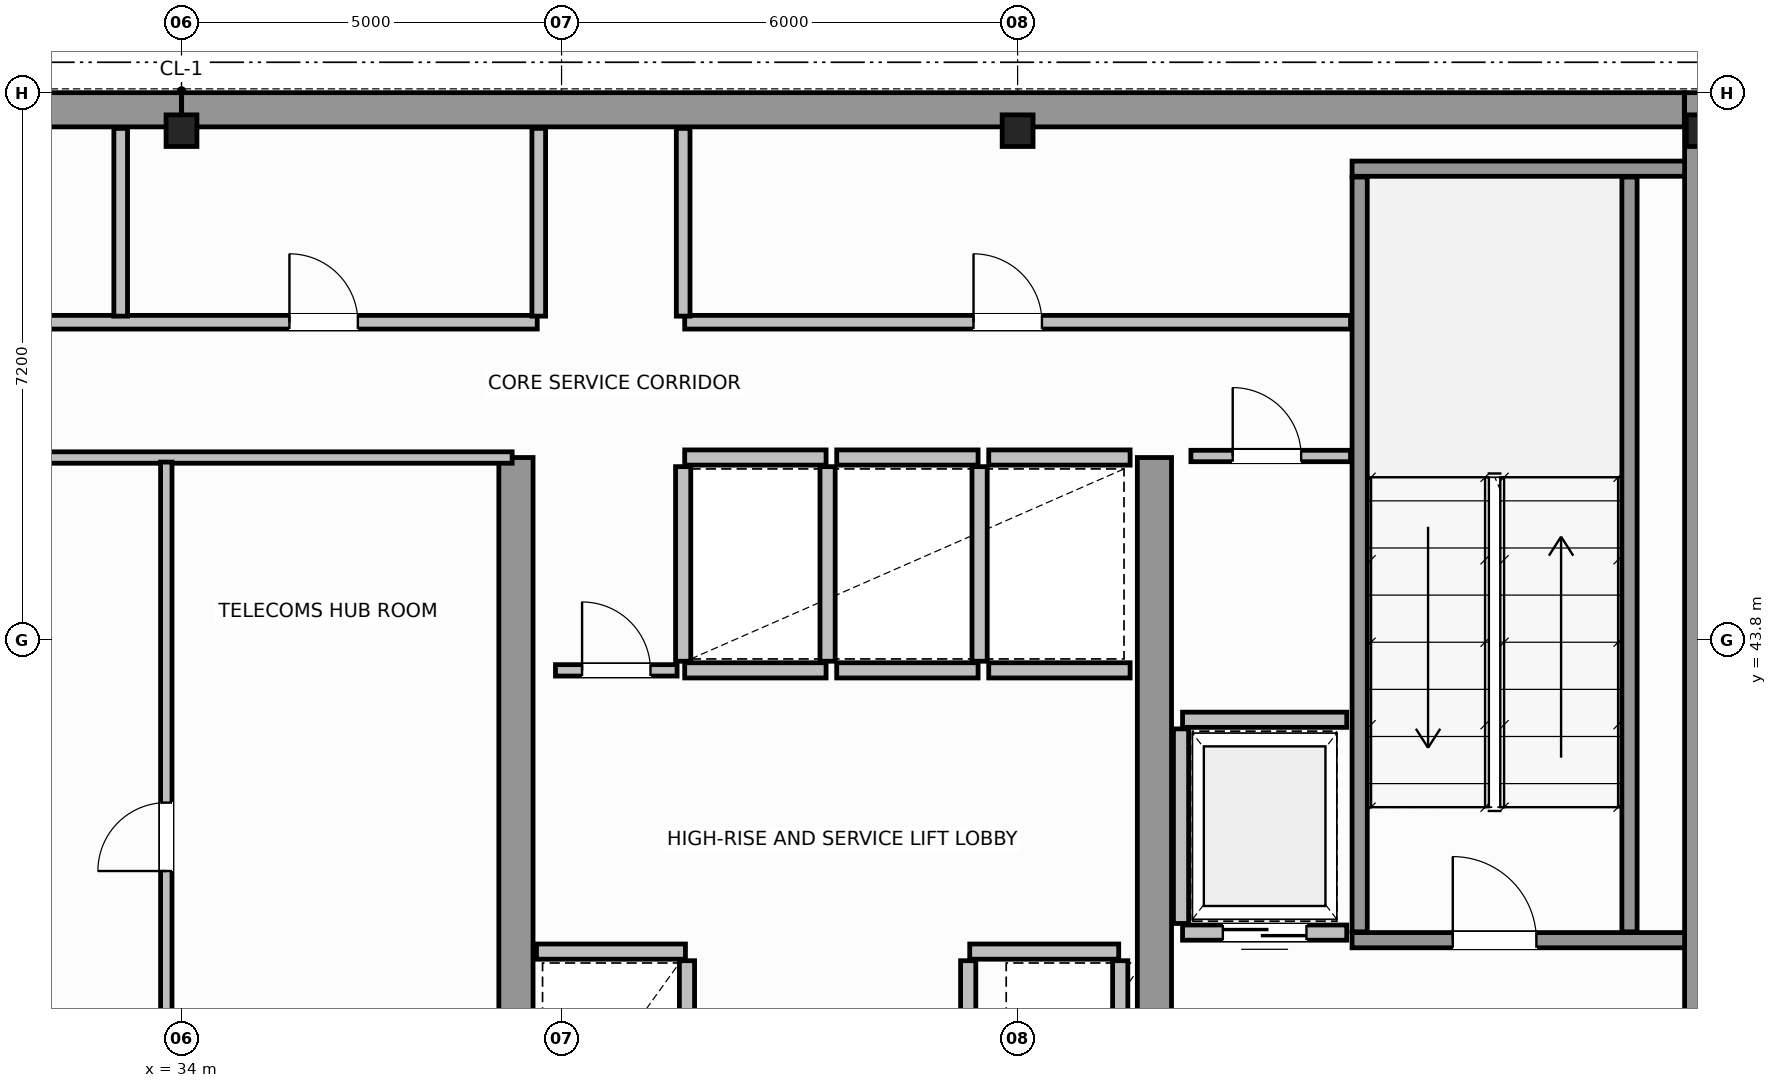
"""IFC4 building model, lengths in metres.
Left out: names, types, materials, properties, quantities, classifications, styles, units other than length and angle.
Written with IfcOpenShell. Run it as: python <this file> out.ifc"""

import sys

from ifc_helpers import new_model, si_unit, direction, frame, frame_2d, origin, origin_2d, place, context, subcontext, project, spatial, rectangle, i_section, extrude, source, transform, mapped, element, fill, save


model = new_model("IFC4")
c1 = context("Model", 3, precision=1e-05, world=origin(), true_north=direction((0.0, 1.0)))
c2 = subcontext(c1, "Body", "Model", "MODEL_VIEW")
j1 = project(units=[si_unit("LENGTHUNIT", "METRE"), si_unit("PLANEANGLEUNIT", "RADIAN")], contexts=[c1])
p1 = place(None, origin())
s1 = spatial("IfcSite", under=j1, at=p1, CompositionType="ELEMENT")
p2 = place(p1, origin())
s2 = spatial("IfcBuilding", under=s1, at=p2, CompositionType="ELEMENT")
p3 = place(p2, frame((0.0, 0.0, 303.8)))
s3 = spatial("IfcBuildingStorey", under=s2, at=p3, CompositionType="ELEMENT", Elevation=303.8)
m1 = source(origin(), c2, "Body", "SweptSolid", [
    extrude(i_section(OverallWidth=0.406, OverallDepth=0.416, WebThickness=0.03, FlangeThickness=0.042, FilletRadius=0.015, at=origin_2d()), origin(), (0.0, 0.0, 1.0), 4.6),
])
for number, where, z_axis, x_axis in (
    (1, (34.0, 50.5, 0.0), (0.0, 0.0, 1.0), (1.0, 0.0, 0.0)),
    (2, (45.0, 50.5, 0.0), (0.0, 0.0, 1.0), (1.0, 0.0, 0.0)),
    (3, (54.0, 50.5, 0.0), (0.0, 0.0, 1.0), (1.0, 0.0, 0.0)),
):
    element("IfcColumn", number, at=place(p3, frame(where, z_axis=z_axis, x_axis=x_axis)), inside=s3, PredefinedType="COLUMN", context=c2, shape_type="MappedRepresentation", body=[
        mapped(m1, transform((0.0, 0.0, 0.0), scale=1.0)),
    ])
for number, where, z_axis, x_axis in (
    (4, (14.229, 50.775, 0.0), (0.0, 0.0, 1.0), (1.0, 0.0, 0.0)),
    (5, (34.002, 50.775, 0.0), (0.0, 0.0, 1.0), (1.0, 0.0, 0.0)),
):
    element("IfcWall", number, at=place(p3, frame(where, z_axis=z_axis, x_axis=x_axis)), inside=s3, PredefinedType="SHEAR", context=c2, shape_type="SweptSolid", body=[
        extrude(rectangle(XDim=19.769, YDim=0.45, at=frame_2d((9.885, 0.0))), origin(), (0.0, 0.0, 1.0), 4.6),
    ])
p4 = place(p3, frame((54.0, 36.5, 0.0), z_axis=(0.0, 0.0, 1.0), x_axis=(0.0, 1.0, 0.0)))
e6 = element("IfcWall", 6, at=p4, inside=s3, PredefinedType="SHEAR", context=c2, shape_type="SweptSolid", body=[
    extrude(rectangle(XDim=14.5, YDim=0.45, at=frame_2d((7.25, 0.0))), origin(), (0.0, 0.0, 1.0), 4.6),
])
for number, where, z_axis, x_axis in (
    (7, (38.4, 36.745, 0.0), (0.0, 0.0, 1.0), (0.0, 1.0, 0.0)),
    (8, (46.8, 36.745, 0.0), (0.0, 0.0, 1.0), (0.0, 1.0, 0.0)),
):
    element("IfcWall", number, at=place(p3, frame(where, z_axis=z_axis, x_axis=x_axis)), inside=s3, PredefinedType="SHEAR", context=c2, shape_type="SweptSolid", body=[
        extrude(rectangle(XDim=9.455, YDim=0.45, at=frame_2d((4.728, 0.0))), origin(), (0.0, 0.0, 1.0), 4.6),
    ])
p5 = place(p3, frame((49.4, 39.85, 0.0), z_axis=(0.0, 0.0, 1.0), x_axis=(1.0, 0.0, 0.0)))
e9 = element("IfcWall", 9, at=p5, inside=s3, PredefinedType="SOLIDWALL", context=c2, shape_type="SweptSolid", body=[
    extrude(rectangle(XDim=4.375, YDim=0.2, at=frame_2d((2.188, 0.0))), origin(), (0.0, 0.0, 1.0), 4.6),
])
p6 = place(p5, frame((1.325, 0.0, 0.0)))
e10 = element("IfcOpeningElement", 10, at=p6, cuts=e9, PredefinedType="OPENING", context=c2, shape_type="SweptSolid", body=[
    extrude(rectangle(XDim=1.1, YDim=2.15, at=frame_2d((0.55, 1.075))), frame((0.0, 0.11, 0.0), z_axis=(0.0, -1.0, 0.0), x_axis=(1.0, 0.0, 0.0)), (0.0, 0.0, 1.0), 0.22),
])
p7 = place(p3, frame((49.4, 50.0, 0.0), z_axis=(0.0, 0.0, 1.0), x_axis=(1.0, 0.0, 0.0)))
e11 = element("IfcWall", 11, at=p7, inside=s3, PredefinedType="SOLIDWALL", context=c2, shape_type="SweptSolid", body=[
    extrude(rectangle(XDim=4.375, YDim=0.2, at=frame_2d((2.188, 0.0))), origin(), (0.0, 0.0, 1.0), 4.6),
])
for number, where, z_axis, x_axis in (
    (12, (49.5, 39.96, 0.0), (0.0, 0.0, 1.0), (0.0, 1.0, 0.0)),
    (13, (53.05, 39.96, 0.0), (0.0, 0.0, 1.0), (0.0, 1.0, 0.0)),
):
    element("IfcWall", number, at=place(p3, frame(where, z_axis=z_axis, x_axis=x_axis)), inside=s3, PredefinedType="SOLIDWALL", context=c2, shape_type="SweptSolid", body=[
        extrude(rectangle(XDim=9.93, YDim=0.2, at=frame_2d((4.965, 0.0))), origin(), (0.0, 0.0, 1.0), 4.6),
    ])
p8 = place(p3, frame((38.67, 39.7, 0.0), z_axis=(0.0, 0.0, 1.0), x_axis=(1.0, 0.0, 0.0)))
e14 = element("IfcWall", 14, at=p8, inside=s3, PredefinedType="SOLIDWALL", context=c2, shape_type="SweptSolid", body=[
    extrude(rectangle(XDim=1.96, YDim=0.2, at=frame_2d((0.98, 0.0))), origin(), (0.0, 0.0, 1.0), 4.3),
])
p9 = place(p3, frame((40.65, 37.02, 0.0), z_axis=(0.0, 0.0, 1.0), x_axis=(0.0, 1.0, 0.0)))
e15 = element("IfcWall", 15, at=p9, inside=s3, PredefinedType="SOLIDWALL", context=c2, shape_type="SweptSolid", body=[
    extrude(rectangle(XDim=2.56, YDim=0.2, at=frame_2d((1.28, 0.0))), origin(), (0.0, 0.0, 1.0), 4.3),
])
p10 = place(p3, frame((44.37, 39.7, 0.0), z_axis=(0.0, 0.0, 1.0), x_axis=(1.0, 0.0, 0.0)))
e16 = element("IfcWall", 16, at=p10, inside=s3, PredefinedType="SOLIDWALL", context=c2, shape_type="SweptSolid", body=[
    extrude(rectangle(XDim=1.96, YDim=0.2, at=frame_2d((0.98, 0.0))), origin(), (0.0, 0.0, 1.0), 4.3),
])
for number, where, z_axis, x_axis in (
    (17, (44.35, 37.02, 0.0), (0.0, 0.0, 1.0), (0.0, 1.0, 0.0)),
    (18, (46.35, 37.02, 0.0), (0.0, 0.0, 1.0), (0.0, 1.0, 0.0)),
):
    element("IfcWall", number, at=place(p3, frame(where, z_axis=z_axis, x_axis=x_axis)), inside=s3, PredefinedType="SOLIDWALL", context=c2, shape_type="SweptSolid", body=[
        extrude(rectangle(XDim=2.56, YDim=0.2, at=frame_2d((1.28, 0.0))), origin(), (0.0, 0.0, 1.0), 4.3),
    ])
for number, where, z_axis, x_axis in (
    (19, (40.62, 43.4, 0.0), (0.0, 0.0, 1.0), (1.0, 0.0, 0.0)),
    (20, (40.62, 46.2, 0.0), (0.0, 0.0, 1.0), (1.0, 0.0, 0.0)),
):
    element("IfcWall", number, at=place(p3, frame(where, z_axis=z_axis, x_axis=x_axis)), inside=s3, PredefinedType="SOLIDWALL", context=c2, shape_type="SweptSolid", body=[
        extrude(rectangle(XDim=1.86, YDim=0.2, at=frame_2d((0.93, 0.0))), origin(), (0.0, 0.0, 1.0), 4.3),
    ])
for number, where, z_axis, x_axis in (
    (21, (40.6, 43.52, 0.0), (0.0, 0.0, 1.0), (0.0, 1.0, 0.0)),
    (22, (42.5, 43.52, 0.0), (0.0, 0.0, 1.0), (0.0, 1.0, 0.0)),
):
    element("IfcWall", number, at=place(p3, frame(where, z_axis=z_axis, x_axis=x_axis)), inside=s3, PredefinedType="SOLIDWALL", context=c2, shape_type="SweptSolid", body=[
        extrude(rectangle(XDim=2.56, YDim=0.2, at=frame_2d((1.28, 0.0))), origin(), (0.0, 0.0, 1.0), 4.3),
    ])
for number, where, z_axis, x_axis in (
    (23, (42.62, 43.4, 0.0), (0.0, 0.0, 1.0), (1.0, 0.0, 0.0)),
    (24, (42.62, 46.2, 0.0), (0.0, 0.0, 1.0), (1.0, 0.0, 0.0)),
):
    element("IfcWall", number, at=place(p3, frame(where, z_axis=z_axis, x_axis=x_axis)), inside=s3, PredefinedType="SOLIDWALL", context=c2, shape_type="SweptSolid", body=[
        extrude(rectangle(XDim=1.86, YDim=0.2, at=frame_2d((0.93, 0.0))), origin(), (0.0, 0.0, 1.0), 4.3),
    ])
p11 = place(p3, frame((44.5, 43.52, 0.0), z_axis=(0.0, 0.0, 1.0), x_axis=(0.0, 1.0, 0.0)))
e25 = element("IfcWall", 25, at=p11, inside=s3, PredefinedType="SOLIDWALL", context=c2, shape_type="SweptSolid", body=[
    extrude(rectangle(XDim=2.56, YDim=0.2, at=frame_2d((1.28, 0.0))), origin(), (0.0, 0.0, 1.0), 3.09),
])
for number, where, z_axis, x_axis in (
    (26, (44.62, 43.4, 0.0), (0.0, 0.0, 1.0), (1.0, 0.0, 0.0)),
    (27, (44.62, 46.2, 0.0), (0.0, 0.0, 1.0), (1.0, 0.0, 0.0)),
):
    element("IfcWall", number, at=place(p3, frame(where, z_axis=z_axis, x_axis=x_axis)), inside=s3, PredefinedType="SOLIDWALL", context=c2, shape_type="SweptSolid", body=[
        extrude(rectangle(XDim=1.86, YDim=0.2, at=frame_2d((0.93, 0.0))), origin(), (0.0, 0.0, 1.0), 4.3),
    ])
p12 = place(p3, frame((47.17, 39.95, 0.0), z_axis=(0.0, 0.0, 1.0), x_axis=(1.0, 0.0, 0.0)))
e28 = element("IfcWall", 28, at=p12, inside=s3, PredefinedType="SOLIDWALL", context=c2, shape_type="SweptSolid", body=[
    extrude(rectangle(XDim=2.16, YDim=0.2, at=frame_2d((1.08, 0.0))), origin(), (0.0, 0.0, 1.0), 4.3),
])
p13 = place(p12, frame((0.53, 0.0, 0.0)))
e29 = element("IfcOpeningElement", 29, at=p13, cuts=e28, PredefinedType="OPENING", context=c2, shape_type="SweptSolid", body=[
    extrude(rectangle(XDim=1.1, YDim=2.15, at=frame_2d((0.55, 1.075))), frame((0.0, 0.11, 0.0), z_axis=(0.0, -1.0, 0.0), x_axis=(1.0, 0.0, 0.0)), (0.0, 0.0, 1.0), 0.22),
])
p14 = place(p3, frame((47.17, 42.75, 0.0), z_axis=(0.0, 0.0, 1.0), x_axis=(1.0, 0.0, 0.0)))
e30 = element("IfcWall", 30, at=p14, inside=s3, PredefinedType="SOLIDWALL", context=c2, shape_type="SweptSolid", body=[
    extrude(rectangle(XDim=2.16, YDim=0.2, at=frame_2d((1.08, 0.0))), origin(), (0.0, 0.0, 1.0), 4.3),
])
p15 = place(p3, frame((47.15, 40.07, 0.0), z_axis=(0.0, 0.0, 1.0), x_axis=(0.0, 1.0, 0.0)))
e31 = element("IfcWall", 31, at=p15, inside=s3, PredefinedType="SOLIDWALL", context=c2, shape_type="SweptSolid", body=[
    extrude(rectangle(XDim=2.56, YDim=0.2, at=frame_2d((1.28, 0.0))), origin(), (0.0, 0.0, 1.0), 4.3),
])
p16 = place(p3, frame((29.85, 46.2, 0.0), z_axis=(0.0, 0.0, 1.0), x_axis=(1.0, 0.0, 0.0)))
e32 = element("IfcWall", 32, at=p16, inside=s3, PredefinedType="PARTITIONING", context=c2, shape_type="SweptSolid", body=[
    extrude(rectangle(XDim=8.5, YDim=0.15, at=frame_2d((4.25, 0.0))), origin(), (0.0, 0.0, 1.0), 4.3),
])
p17 = place(p3, frame((33.8, 36.56, 0.0), z_axis=(0.0, 0.0, 1.0), x_axis=(0.0, 1.0, 0.0)))
e33 = element("IfcWall", 33, at=p17, inside=s3, PredefinedType="PARTITIONING", context=c2, shape_type="SweptSolid", body=[
    extrude(rectangle(XDim=9.58, YDim=0.15, at=frame_2d((4.79, 0.0))), origin(), (0.0, 0.0, 1.0), 4.3),
])
p18 = place(p17, frame((4.2, 0.0, 0.0)))
e34 = element("IfcOpeningElement", 34, at=p18, cuts=e33, PredefinedType="OPENING", context=c2, shape_type="SweptSolid", body=[
    extrude(rectangle(XDim=0.9, YDim=2.1, at=frame_2d((0.45, 1.05))), frame((0.0, 0.085, 0.0), z_axis=(0.0, -1.0, 0.0), x_axis=(1.0, 0.0, 0.0)), (0.0, 0.0, 1.0), 0.17),
])
p19 = place(p3, frame((47.28, 46.22, 0.0), z_axis=(0.0, 0.0, 1.0), x_axis=(1.0, 0.0, 0.0)))
e35 = element("IfcWall", 35, at=p19, inside=s3, PredefinedType="PARTITIONING", context=c2, shape_type="SweptSolid", body=[
    extrude(rectangle(XDim=2.1, YDim=0.15, at=frame_2d((1.05, 0.0))), origin(), (0.0, 0.0, 1.0), 4.3),
])
p20 = place(p19, frame((0.55, 0.0, 0.0)))
e36 = element("IfcOpeningElement", 36, at=p20, cuts=e35, PredefinedType="OPENING", context=c2, shape_type="SweptSolid", body=[
    extrude(rectangle(XDim=0.9, YDim=2.1, at=frame_2d((0.45, 1.05))), frame((0.0, 0.085, 0.0), z_axis=(0.0, -1.0, 0.0), x_axis=(1.0, 0.0, 0.0)), (0.0, 0.0, 1.0), 0.17),
])
p21 = place(p3, frame((38.92, 43.4, 0.0), z_axis=(0.0, 0.0, 1.0), x_axis=(1.0, 0.0, 0.0)))
e37 = element("IfcWall", 37, at=p21, inside=s3, PredefinedType="PARTITIONING", context=c2, shape_type="SweptSolid", body=[
    extrude(rectangle(XDim=1.6, YDim=0.15, at=frame_2d((0.8, 0.0))), origin(), (0.0, 0.0, 1.0), 4.3),
])
p22 = place(p21, frame((0.35, 0.0, 0.0)))
e38 = element("IfcOpeningElement", 38, at=p22, cuts=e37, PredefinedType="OPENING", context=c2, shape_type="SweptSolid", body=[
    extrude(rectangle(XDim=0.9, YDim=2.1, at=frame_2d((0.45, 1.05))), frame((0.0, 0.085, 0.0), z_axis=(0.0, -1.0, 0.0), x_axis=(1.0, 0.0, 0.0)), (0.0, 0.0, 1.0), 0.17),
])
p23 = place(p3, frame((18.62, 47.98, 0.0), z_axis=(0.0, 0.0, 1.0), x_axis=(1.0, 0.0, 0.0)))
e39 = element("IfcWall", 39, at=p23, inside=s3, PredefinedType="PLUMBINGWALL", context=c2, shape_type="SweptSolid", body=[
    extrude(rectangle(XDim=20.06, YDim=0.18, at=frame_2d((10.03, 0.0))), origin(), (0.0, 0.0, 1.0), 4.3),
])
p24 = place(p23, frame((3.5, 0.0, 0.0)))
e40 = element("IfcOpeningElement", 40, at=p24, cuts=e39, PredefinedType="OPENING", context=c2, shape_type="SweptSolid", body=[
    extrude(rectangle(XDim=0.9, YDim=2.15, at=frame_2d((0.45, 1.075))), frame((0.0, 0.1, 0.0), z_axis=(0.0, -1.0, 0.0), x_axis=(1.0, 0.0, 0.0)), (0.0, 0.0, 1.0), 0.2),
])
p25 = place(p23, frame((10.8, 0.0, 0.0)))
e41 = element("IfcOpeningElement", 41, at=p25, cuts=e39, PredefinedType="OPENING", context=c2, shape_type="SweptSolid", body=[
    extrude(rectangle(XDim=0.9, YDim=2.15, at=frame_2d((0.45, 1.075))), frame((0.0, 0.1, 0.0), z_axis=(0.0, -1.0, 0.0), x_axis=(1.0, 0.0, 0.0)), (0.0, 0.0, 1.0), 0.2),
])
p26 = place(p23, frame((16.8, 0.0, 0.0)))
e42 = element("IfcOpeningElement", 42, at=p26, cuts=e39, PredefinedType="OPENING", context=c2, shape_type="SweptSolid", body=[
    extrude(rectangle(XDim=0.9, YDim=2.15, at=frame_2d((0.45, 1.075))), frame((0.0, 0.1, 0.0), z_axis=(0.0, -1.0, 0.0), x_axis=(1.0, 0.0, 0.0)), (0.0, 0.0, 1.0), 0.2),
])
p27 = place(p3, frame((40.62, 47.98, 0.0), z_axis=(0.0, 0.0, 1.0), x_axis=(1.0, 0.0, 0.0)))
e43 = element("IfcWall", 43, at=p27, inside=s3, PredefinedType="PLUMBINGWALL", context=c2, shape_type="SweptSolid", body=[
    extrude(rectangle(XDim=8.76, YDim=0.18, at=frame_2d((4.38, 0.0))), origin(), (0.0, 0.0, 1.0), 4.3),
])
p28 = place(p27, frame((3.8, 0.0, 0.0)))
e44 = element("IfcOpeningElement", 44, at=p28, cuts=e43, PredefinedType="OPENING", context=c2, shape_type="SweptSolid", body=[
    extrude(rectangle(XDim=0.9, YDim=2.15, at=frame_2d((0.45, 1.075))), frame((0.0, 0.1, 0.0), z_axis=(0.0, -1.0, 0.0), x_axis=(1.0, 0.0, 0.0)), (0.0, 0.0, 1.0), 0.2),
])
for number, where, z_axis, x_axis in (
    (45, (33.2, 48.06, 0.0), (0.0, 0.0, 1.0), (0.0, 1.0, 0.0)),
    (46, (38.7, 48.06, 0.0), (0.0, 0.0, 1.0), (0.0, 1.0, 0.0)),
    (47, (40.6, 48.06, 0.0), (0.0, 0.0, 1.0), (0.0, 1.0, 0.0)),
):
    element("IfcWall", number, at=place(p3, frame(where, z_axis=z_axis, x_axis=x_axis)), inside=s3, PredefinedType="PLUMBINGWALL", context=c2, shape_type="SweptSolid", body=[
        extrude(rectangle(XDim=2.47, YDim=0.18, at=frame_2d((1.235, 0.0))), origin(), (0.0, 0.0, 1.0), 4.3),
    ])
m2 = source(origin(), c2, "Body", "SweptSolid", [
    extrude(rectangle(XDim=1.1, YDim=2.15, at=frame_2d((0.55, 1.075))), frame((0.0, 0.025, 0.0), z_axis=(0.0, -1.0, 0.0), x_axis=(1.0, 0.0, 0.0)), (0.0, 0.0, 1.0), 0.05),
])
p29 = place(p6, origin())
e48 = element("IfcDoor", 48, at=p29, inside=s3, OperationType="SINGLE_SWING_RIGHT", PredefinedType="DOOR", context=c2, shape_type="MappedRepresentation", body=[
    mapped(m2, transform((0.0, 0.0, 0.0), scale=1.0)),
])
fill(e10, e48)
p30 = place(p13, origin())
e49 = element("IfcDoor", 49, at=p30, inside=s3, OperationType="DOUBLE_DOOR_SLIDING", PredefinedType="DOOR", context=c2, shape_type="MappedRepresentation", body=[
    mapped(m2, transform((0.0, 0.0, 0.0), scale=1.0)),
])
fill(e29, e49)
m3 = source(origin(), c2, "Body", "SweptSolid", [
    extrude(rectangle(XDim=0.9, YDim=2.1, at=frame_2d((0.45, 1.05))), frame((0.0, 0.025, 0.0), z_axis=(0.0, -1.0, 0.0), x_axis=(1.0, 0.0, 0.0)), (0.0, 0.0, 1.0), 0.05),
])
p31 = place(p18, origin())
e50 = element("IfcDoor", 50, at=p31, inside=s3, OperationType="SINGLE_SWING_RIGHT", PredefinedType="DOOR", context=c2, shape_type="MappedRepresentation", body=[
    mapped(m3, transform((0.0, 0.0, 0.0), scale=1.0)),
])
fill(e34, e50)
p32 = place(p20, origin())
e51 = element("IfcDoor", 51, at=p32, inside=s3, OperationType="SINGLE_SWING_RIGHT", PredefinedType="DOOR", context=c2, shape_type="MappedRepresentation", body=[
    mapped(m3, transform((0.0, 0.0, 0.0), scale=1.0)),
])
fill(e36, e51)
p33 = place(p22, origin())
e52 = element("IfcDoor", 52, at=p33, inside=s3, OperationType="SINGLE_SWING_LEFT", PredefinedType="DOOR", context=c2, shape_type="MappedRepresentation", body=[
    mapped(m3, transform((0.0, 0.0, 0.0), scale=1.0)),
])
fill(e38, e52)
m4 = source(origin(), c2, "Body", "SweptSolid", [
    extrude(rectangle(XDim=0.9, YDim=2.15, at=frame_2d((0.45, 1.075))), frame((0.0, 0.025, 0.0), z_axis=(0.0, -1.0, 0.0), x_axis=(1.0, 0.0, 0.0)), (0.0, 0.0, 1.0), 0.05),
])
p34 = place(p26, origin())
e53 = element("IfcDoor", 53, at=p34, inside=s3, OperationType="SINGLE_SWING_LEFT", PredefinedType="DOOR", context=c2, shape_type="MappedRepresentation", body=[
    mapped(m4, transform((0.0, 0.0, 0.0), scale=1.0)),
])
fill(e42, e53)
p35 = place(p28, origin())
e54 = element("IfcDoor", 54, at=p35, inside=s3, OperationType="SINGLE_SWING_RIGHT", PredefinedType="DOOR", context=c2, shape_type="MappedRepresentation", body=[
    mapped(m4, transform((0.0, 0.0, 0.0), scale=1.0)),
])
fill(e44, e54)
save(model, sys.argv[1])
